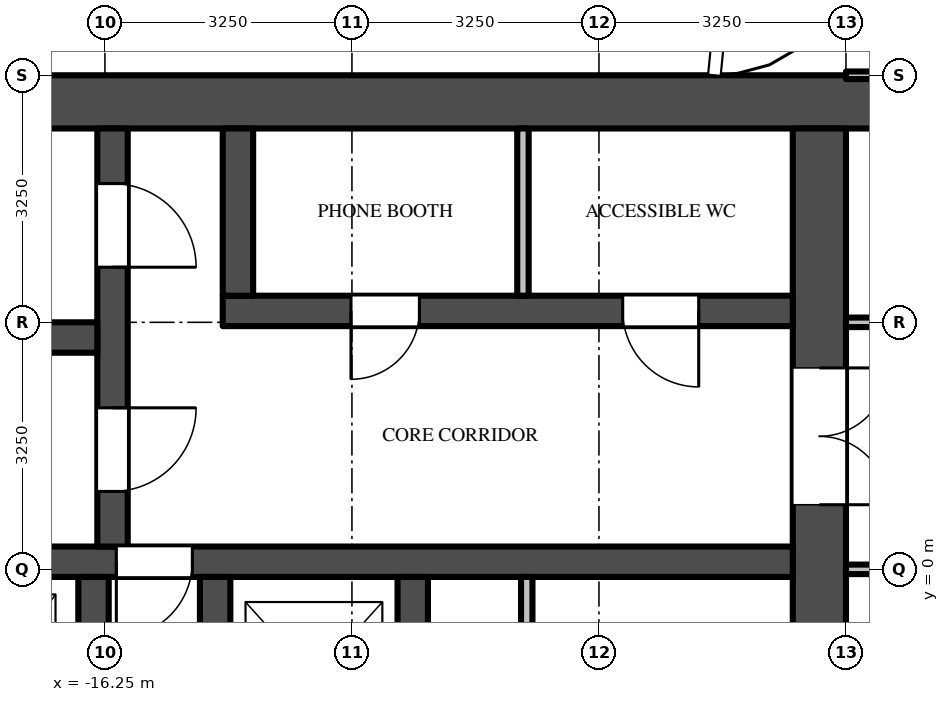
"""IFC4 building model, lengths in metres.
Left out: names, types, materials, properties, quantities, classifications, styles, units other than length and angle.
Written with IfcOpenShell. Run it as: python <this file> out.ifc"""

import sys

from ifc_helpers import new_model, si_unit, direction, frame, frame_2d, origin, place, context, subcontext, project, spatial, rectangle, extrude, source, transform, mapped, element, fill, save


model = new_model("IFC4")
c1 = context("Model", 3, precision=1e-05, world=origin(), true_north=direction((0.0, 1.0)))
c2 = subcontext(c1, "Body", "Model", "MODEL_VIEW")
j1 = project(units=[si_unit("LENGTHUNIT", "METRE"), si_unit("PLANEANGLEUNIT", "RADIAN")], contexts=[c1])
p1 = place(None, origin())
s1 = spatial("IfcSite", under=j1, at=p1, CompositionType="ELEMENT")
p2 = place(p1, origin())
s2 = spatial("IfcBuilding", under=s1, at=p2, CompositionType="ELEMENT")
p3 = place(p2, frame((0.0, 0.0, 326.2)))
s3 = spatial("IfcBuildingStorey", under=s2, at=p3, CompositionType="ELEMENT", Elevation=326.2)
m1 = source(origin(), c2, "Body", "SweptSolid", [
    extrude(rectangle(XDim=16.65, YDim=0.7, at=frame_2d((8.325, 0.0))), origin(), (0.0, 0.0, 1.0), 3.5),
])
p4 = place(p3, frame((-6.1, 6.15, 0.0), z_axis=(0.0, 0.0, 1.0), x_axis=(-1.0, 0.0, 0.0)))
e1 = element("IfcWall", 1, at=p4, inside=s3, PredefinedType="SHEAR", context=c2, shape_type="MappedRepresentation", body=[
    mapped(m1, transform((0.0, 0.0, 0.0))),
])
m2 = source(origin(), c2, "Body", "SweptSolid", [
    extrude(rectangle(XDim=9.05, YDim=0.7, at=frame_2d((4.525, 0.0))), origin(), (0.0, 0.0, 1.0), 3.5),
])
p5 = place(p3, frame((-6.85, 5.8, 0.0), z_axis=(0.0, 0.0, 1.0), x_axis=(0.0, -1.0, 0.0)))
e2 = element("IfcWall", 2, at=p5, inside=s3, PredefinedType="SHEAR", context=c2, shape_type="MappedRepresentation", body=[
    mapped(m2, transform((0.0, 0.0, 0.0))),
])
m3 = source(origin(), c2, "Body", "SweptSolid", [
    extrude(rectangle(XDim=1.8, YDim=2.1, at=frame_2d((0.9, 1.05))), frame((0.0, 0.36, 0.0), z_axis=(0.0, -1.0, 0.0), x_axis=(1.0, 0.0, 0.0)), (0.0, 0.0, 1.0), 0.72),
])
p6 = place(p5, frame((3.15, 0.0, 0.0)))
e3 = element("IfcOpeningElement", 3, at=p6, cuts=e2, PredefinedType="OPENING", context=c2, shape_type="MappedRepresentation", body=[
    mapped(m3, transform((0.0, 0.0, 0.0))),
])
m4 = source(origin(), c2, "Body", "SweptSolid", [
    extrude(rectangle(XDim=7.5, YDim=0.4, at=frame_2d((3.75, 0.0))), origin(), (0.0, 0.0, 1.0), 3.5),
])
p7 = place(p3, frame((-7.2, 3.4, 0.0), z_axis=(0.0, 0.0, 1.0), x_axis=(-1.0, 0.0, 0.0)))
e4 = element("IfcWall", 4, at=p7, inside=s3, PredefinedType="SHEAR", context=c2, shape_type="MappedRepresentation", body=[
    mapped(m4, transform((0.0, 0.0, 0.0))),
])
m5 = source(origin(), c2, "Body", "SweptSolid", [
    extrude(rectangle(XDim=1.0, YDim=2.1, at=frame_2d((0.5, 1.05))), frame((0.0, 0.21, 0.0), z_axis=(0.0, -1.0, 0.0), x_axis=(1.0, 0.0, 0.0)), (0.0, 0.0, 1.0), 0.42),
])
p8 = place(p7, frame((1.238, 0.0, 0.0)))
e5 = element("IfcOpeningElement", 5, at=p8, cuts=e4, PredefinedType="OPENING", context=c2, shape_type="MappedRepresentation", body=[
    mapped(m5, transform((0.0, 0.0, 0.0))),
])
m6 = source(origin(), c2, "Body", "SweptSolid", [
    extrude(rectangle(XDim=0.9, YDim=2.1, at=frame_2d((0.45, 1.05))), frame((0.0, 0.21, 0.0), z_axis=(0.0, -1.0, 0.0), x_axis=(1.0, 0.0, 0.0)), (0.0, 0.0, 1.0), 0.42),
])
p9 = place(p7, frame((4.913, 0.0, 0.0)))
e6 = element("IfcOpeningElement", 6, at=p9, cuts=e4, PredefinedType="OPENING", context=c2, shape_type="MappedRepresentation", body=[
    mapped(m6, transform((0.0, 0.0, 0.0))),
])
m7 = source(origin(), c2, "Body", "SweptSolid", [
    extrude(rectangle(XDim=14.85, YDim=0.4, at=frame_2d((7.425, 0.0))), origin(), (0.0, 0.0, 1.0), 3.5),
])
p10 = place(p3, frame((-7.2, 0.1, 0.0), z_axis=(0.0, 0.0, 1.0), x_axis=(-1.0, 0.0, 0.0)))
e7 = element("IfcWall", 7, at=p10, inside=s3, PredefinedType="SHEAR", context=c2, shape_type="MappedRepresentation", body=[
    mapped(m7, transform((0.0, 0.0, 0.0))),
])
p11 = place(p10, frame((7.9, 0.0, 0.0)))
e8 = element("IfcOpeningElement", 8, at=p11, cuts=e7, PredefinedType="OPENING", context=c2, shape_type="MappedRepresentation", body=[
    mapped(m5, transform((0.0, 0.0, 0.0))),
])
m8 = source(origin(), c2, "Body", "SweptSolid", [
    extrude(rectangle(XDim=5.5, YDim=0.4, at=frame_2d((2.75, 0.0))), origin(), (0.0, 0.0, 1.0), 3.5),
])
p12 = place(p3, frame((-16.15, 5.8, 0.0), z_axis=(0.0, 0.0, 1.0), x_axis=(0.0, -1.0, 0.0)))
e9 = element("IfcWall", 9, at=p12, inside=s3, PredefinedType="SHEAR", context=c2, shape_type="MappedRepresentation", body=[
    mapped(m8, transform((0.0, 0.0, 0.0))),
])
m9 = source(origin(), c2, "Body", "SweptSolid", [
    extrude(rectangle(XDim=1.1, YDim=2.1, at=frame_2d((0.55, 1.05))), frame((0.0, 0.21, 0.0), z_axis=(0.0, -1.0, 0.0), x_axis=(1.0, 0.0, 0.0)), (0.0, 0.0, 1.0), 0.42),
])
p13 = place(p12, frame((0.725, 0.0, 0.0)))
e10 = element("IfcOpeningElement", 10, at=p13, cuts=e9, PredefinedType="OPENING", context=c2, shape_type="MappedRepresentation", body=[
    mapped(m9, transform((0.0, 0.0, 0.0))),
])
p14 = place(p12, frame((3.675, 0.0, 0.0)))
e11 = element("IfcOpeningElement", 11, at=p14, cuts=e9, PredefinedType="OPENING", context=c2, shape_type="MappedRepresentation", body=[
    mapped(m9, transform((0.0, 0.0, 0.0))),
])
m10 = source(origin(), c2, "Body", "SweptSolid", [
    extrude(rectangle(XDim=5.7, YDim=0.4, at=frame_2d((2.85, 0.0))), origin(), (0.0, 0.0, 1.0), 3.5),
])
p15 = place(p3, frame((-16.35, 3.05, 0.0), z_axis=(0.0, 0.0, 1.0), x_axis=(-1.0, 0.0, 0.0)))
e12 = element("IfcWall", 12, at=p15, inside=s3, PredefinedType="SHEAR", context=c2, shape_type="MappedRepresentation", body=[
    mapped(m10, transform((0.0, 0.0, 0.0))),
])
m11 = source(origin(), c2, "Body", "SweptSolid", [
    extrude(rectangle(XDim=2.2, YDim=0.4, at=frame_2d((1.1, 0.0))), origin(), (0.0, 0.0, 1.0), 3.5),
])
p16 = place(p3, frame((-14.5, 5.8, 0.0), z_axis=(0.0, 0.0, 1.0), x_axis=(0.0, -1.0, 0.0)))
e13 = element("IfcWall", 13, at=p16, inside=s3, PredefinedType="SHEAR", context=c2, shape_type="MappedRepresentation", body=[
    mapped(m11, transform((0.0, 0.0, 0.0))),
])
m12 = source(origin(), c2, "Body", "SweptSolid", [
    extrude(rectangle(XDim=2.45, YDim=0.4, at=frame_2d((1.225, 0.0))), origin(), (0.0, 0.0, 1.0), 3.5),
])
for number, where, z_axis, x_axis in (
    (14, (-12.2, -0.1, 0.0), (0.0, 0.0, 1.0), (0.0, -1.0, 0.0)),
    (15, (-14.8, -0.1, 0.0), (0.0, 0.0, 1.0), (0.0, -1.0, 0.0)),
    (16, (-16.4, -0.1, 0.0), (0.0, 0.0, 1.0), (0.0, -1.0, 0.0)),
):
    element("IfcWall", number, at=place(p3, frame(where, z_axis=z_axis, x_axis=x_axis)), inside=s3, PredefinedType="SHEAR", context=c2, shape_type="MappedRepresentation", body=[
        mapped(m12, transform((0.0, 0.0, 0.0))),
    ])
m13 = source(origin(), c2, "Body", "SweptSolid", [
    extrude(rectangle(XDim=2.2, YDim=0.15, at=frame_2d((1.1, 0.0))), origin(), (0.0, 0.0, 1.0), 3.5),
])
p17 = place(p3, frame((-10.75, 5.8, 0.0), z_axis=(0.0, 0.0, 1.0), x_axis=(0.0, -1.0, 0.0)))
e17 = element("IfcWall", 17, at=p17, inside=s3, PredefinedType="PARTITIONING", context=c2, shape_type="MappedRepresentation", body=[
    mapped(m13, transform((0.0, 0.0, 0.0))),
])
m14 = source(origin(), c2, "Body", "SweptSolid", [
    extrude(rectangle(XDim=2.45, YDim=0.15, at=frame_2d((1.225, 0.0))), origin(), (0.0, 0.0, 1.0), 3.5),
])
p18 = place(p3, frame((-10.7, -0.1, 0.0), z_axis=(0.0, 0.0, 1.0), x_axis=(0.0, -1.0, 0.0)))
e18 = element("IfcWall", 18, at=p18, inside=s3, PredefinedType="PARTITIONING", context=c2, shape_type="MappedRepresentation", body=[
    mapped(m14, transform((0.0, 0.0, 0.0))),
])
m15 = source(origin(), c2, "Body", "SweptSolid", [
    extrude(rectangle(XDim=5.363, YDim=0.125, at=frame_2d((2.681, 0.0))), origin(), (0.0, 0.0, 1.0), 2.718),
])
p19 = place(p3, frame((-1.137, 0.0, 0.0), z_axis=(0.0, 0.0, 1.0), x_axis=(-1.0, 0.0, 0.0)))
e19 = element("IfcWall", 19, at=p19, inside=s3, PredefinedType="PARTITIONING", context=c2, shape_type="MappedRepresentation", body=[
    mapped(m15, transform((0.0, 0.0, 0.0))),
])
p20 = place(p3, frame((-6.5, 3.25, 0.0), z_axis=(0.0, 0.0, 1.0), x_axis=(1.0, 0.0, 0.0)))
e20 = element("IfcWall", 20, at=p20, inside=s3, PredefinedType="PARTITIONING", context=c2, shape_type="MappedRepresentation", body=[
    mapped(m15, transform((0.0, 0.0, 0.0))),
])
m16 = source(origin(), c2, "Body", "SweptSolid", [
    extrude(rectangle(XDim=1.0, YDim=2.1, at=frame_2d((0.5, 1.05))), frame((0.0, 0.073, 0.0), z_axis=(0.0, -1.0, 0.0), x_axis=(1.0, 0.0, 0.0)), (0.0, 0.0, 1.0), 0.145),
])
p21 = place(p20, frame((3.95, 0.0, 0.0)))
e21 = element("IfcOpeningElement", 21, at=p21, cuts=e20, PredefinedType="OPENING", context=c2, shape_type="MappedRepresentation", body=[
    mapped(m16, transform((0.0, 0.0, 0.0))),
])
p22 = place(p3, frame((-6.5, 6.5, 0.0), z_axis=(0.0, 0.0, 1.0), x_axis=(1.0, 0.0, 0.0)))
e22 = element("IfcWall", 22, at=p22, inside=s3, PredefinedType="PARTITIONING", context=c2, shape_type="SweptSolid", body=[
    extrude(rectangle(XDim=5.363, YDim=0.1, at=frame_2d((2.681, 0.0))), origin(), (0.0, 0.0, 1.0), 2.58),
])
m17 = source(origin(), c2, "Body", "SweptSolid", [
    extrude(rectangle(XDim=1.8, YDim=2.1, at=frame_2d((0.9, 1.05))), frame((0.0, -0.275, 0.0), z_axis=(0.0, -1.0, 0.0), x_axis=(1.0, 0.0, 0.0)), (0.0, 0.0, 1.0), 0.05),
])
p23 = place(p6, origin())
e23 = element("IfcDoor", 23, at=p23, inside=s3, OperationType="DOUBLE_DOOR_SINGLE_SWING", PredefinedType="DOOR", context=c2, shape_type="MappedRepresentation", body=[
    mapped(m17, transform((0.0, 0.0, 0.0))),
])
fill(e3, e23)
m18 = source(origin(), c2, "Body", "SweptSolid", [
    extrude(rectangle(XDim=1.1, YDim=2.1, at=frame_2d((0.55, 1.05))), frame((0.0, 0.025, 0.0), z_axis=(0.0, -1.0, 0.0), x_axis=(1.0, 0.0, 0.0)), (0.0, 0.0, 1.0), 0.05),
])
p24 = place(p13, origin())
e24 = element("IfcDoor", 24, at=p24, inside=s3, OperationType="SINGLE_SWING_RIGHT", PredefinedType="DOOR", context=c2, shape_type="MappedRepresentation", body=[
    mapped(m18, transform((0.0, 0.0, 0.0))),
])
fill(e10, e24)
p25 = place(p14, origin())
e25 = element("IfcDoor", 25, at=p25, inside=s3, OperationType="SINGLE_SWING_LEFT", PredefinedType="DOOR", context=c2, shape_type="MappedRepresentation", body=[
    mapped(m18, transform((0.0, 0.0, 0.0))),
])
fill(e11, e25)
m19 = source(origin(), c2, "Body", "SweptSolid", [
    extrude(rectangle(XDim=1.0, YDim=2.1, at=frame_2d((0.5, 1.05))), frame((0.0, 0.025, 0.0), z_axis=(0.0, -1.0, 0.0), x_axis=(1.0, 0.0, 0.0)), (0.0, 0.0, 1.0), 0.05),
])
p26 = place(p11, origin())
e26 = element("IfcDoor", 26, at=p26, inside=s3, OperationType="SINGLE_SWING_RIGHT", PredefinedType="DOOR", context=c2, shape_type="MappedRepresentation", body=[
    mapped(m19, transform((0.0, 0.0, 0.0))),
])
fill(e8, e26)
p27 = place(p8, origin())
e27 = element("IfcDoor", 27, at=p27, inside=s3, OperationType="SINGLE_SWING_LEFT", PredefinedType="DOOR", context=c2, shape_type="MappedRepresentation", body=[
    mapped(m19, transform((0.0, 0.0, 0.0))),
])
fill(e5, e27)
m20 = source(origin(), c2, "Body", "SweptSolid", [
    extrude(rectangle(XDim=0.9, YDim=2.1, at=frame_2d((0.45, 1.05))), frame((0.0, 0.025, 0.0), z_axis=(0.0, -1.0, 0.0), x_axis=(1.0, 0.0, 0.0)), (0.0, 0.0, 1.0), 0.05),
])
p28 = place(p9, origin())
e28 = element("IfcDoor", 28, at=p28, inside=s3, OperationType="SINGLE_SWING_RIGHT", PredefinedType="DOOR", context=c2, shape_type="MappedRepresentation", body=[
    mapped(m20, transform((0.0, 0.0, 0.0))),
])
fill(e6, e28)
save(model, sys.argv[1])
